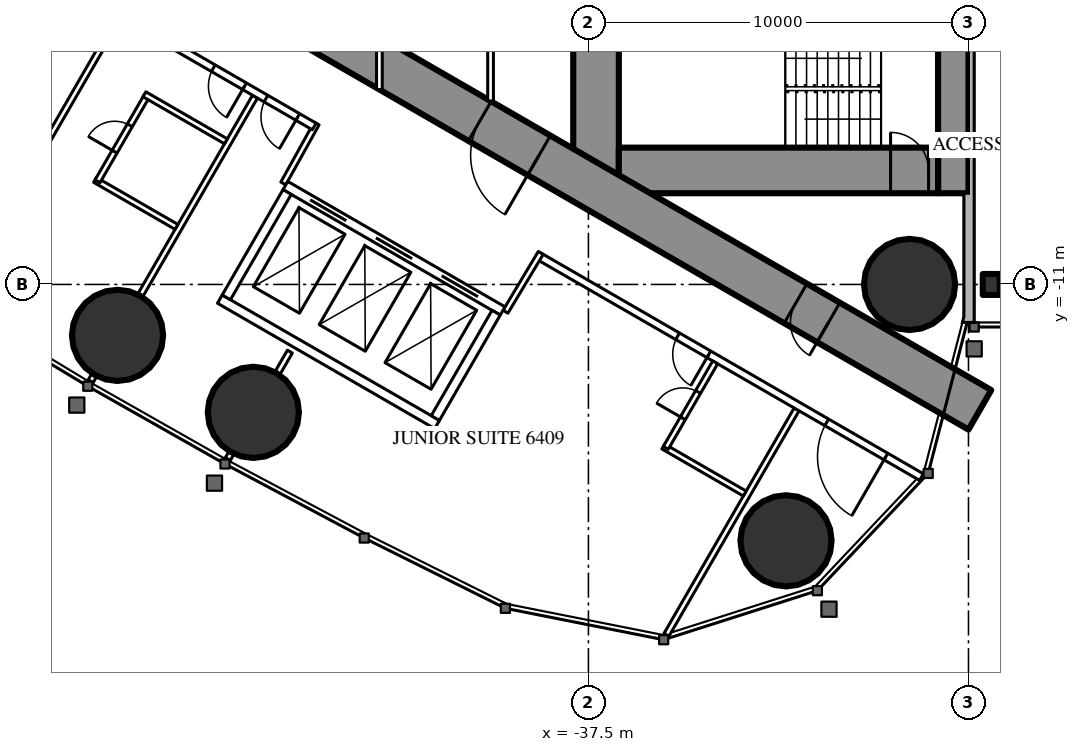
"""IFC4 building model, lengths in metres.
Left out: names, types, materials, properties, quantities, classifications, styles, units other than length and angle.
Written with IfcOpenShell. Run it as: python <this file> out.ifc"""

import sys

from ifc_helpers import new_model, si_unit, direction, frame, frame_2d, origin, origin_2d, place, context, subcontext, project, spatial, rectangle, circle, i_section, extrude, element, fill, save


model = new_model("IFC4")
c1 = context("Model", 3, precision=1e-05, world=origin(), true_north=direction((0.0, 1.0)))
c2 = subcontext(c1, "Body", "Model", "MODEL_VIEW")
j1 = project(units=[si_unit("LENGTHUNIT", "METRE"), si_unit("PLANEANGLEUNIT", "RADIAN")], contexts=[c1])
p1 = place(None, origin())
s1 = spatial("IfcSite", under=j1, at=p1, CompositionType="ELEMENT")
p2 = place(p1, origin())
s2 = spatial("IfcBuilding", under=s1, at=p2, CompositionType="ELEMENT")
p3 = place(p2, frame((0.0, 0.0, 240.5)))
s3 = spatial("IfcBuildingStorey", under=s2, at=p3, CompositionType="ELEMENT", Elevation=240.5)
for number, where, z_axis, x_axis in (
    (1, (-32.301, -17.745, 0.0), (0.0, 0.0, 1.0), (1.0, 0.0, 0.0)),
    (2, (-29.05, -11.0, 0.0), (0.0, 0.0, 1.0), (1.0, 0.0, 0.0)),
    (3, (-49.89, -12.34, 0.0), (0.0, 0.0, 1.0), (1.0, 0.0, 0.0)),
    (4, (-46.317, -14.365, 0.0), (0.0, 0.0, 1.0), (1.0, 0.0, 0.0)),
):
    element("IfcColumn", number, at=place(p3, frame(where, z_axis=z_axis, x_axis=x_axis)), inside=s3, PredefinedType="COLUMN", context=c2, shape_type="SweptSolid", body=[
        extrude(circle(Radius=1.2, at=origin_2d()), origin(), (0.0, 0.0, 1.0), 3.6),
    ])
p4 = place(p3, frame((-27.9, 8.6, 0.0), z_axis=(0.0, 0.0, 1.0), x_axis=(0.0, -1.0, 0.0)))
e5 = element("IfcWall", 5, at=p4, inside=s3, PredefinedType="SHEAR", context=c2, shape_type="SweptSolid", body=[
    extrude(rectangle(XDim=17.2, YDim=0.8, at=frame_2d((8.6, 0.0))), origin(), (0.0, 0.0, 1.0), 3.6),
])
p5 = place(p4, frame((6.95, 0.0, 0.0)))
e6 = element("IfcOpeningElement", 6, at=p5, cuts=e5, PredefinedType="OPENING", context=c2, shape_type="SweptSolid", body=[
    extrude(rectangle(XDim=0.9, YDim=2.2, at=frame_2d((0.45, 1.1))), frame((0.0, 0.41, 0.0), z_axis=(0.0, -1.0, 0.0), x_axis=(1.0, 0.0, 0.0)), (0.0, 0.0, 1.0), 0.82),
])
p6 = place(p3, frame((-37.3, 8.6, 0.0), z_axis=(0.0, 0.0, 1.0), x_axis=(0.0, -1.0, 0.0)))
e7 = element("IfcWall", 7, at=p6, inside=s3, PredefinedType="SHEAR", context=c2, shape_type="SweptSolid", body=[
    extrude(rectangle(XDim=17.2, YDim=1.2, at=frame_2d((8.6, 0.0))), origin(), (0.0, 0.0, 1.0), 3.6),
])
p7 = place(p6, frame((7.7, 0.0, 0.0)))
e8 = element("IfcOpeningElement", 8, at=p7, cuts=e7, PredefinedType="OPENING", context=c2, shape_type="SweptSolid", body=[
    extrude(rectangle(XDim=1.8, YDim=2.2, at=frame_2d((0.9, 1.1))), frame((0.0, 0.61, 0.0), z_axis=(0.0, -1.0, 0.0), x_axis=(1.0, 0.0, 0.0)), (0.0, 0.0, 1.0), 1.22),
])
p8 = place(p3, frame((-28.3, -8.0, 0.0), z_axis=(0.0, 0.0, 1.0), x_axis=(-1.0, 0.0, 0.0)))
e9 = element("IfcWall", 9, at=p8, inside=s3, PredefinedType="SHEAR", context=c2, shape_type="SweptSolid", body=[
    extrude(rectangle(XDim=8.4, YDim=1.2, at=frame_2d((4.2, 0.0))), origin(), (0.0, 0.0, 1.0), 3.6),
])
p9 = place(p8, frame((0.25, 0.0, 0.0)))
e10 = element("IfcOpeningElement", 10, at=p9, cuts=e9, PredefinedType="OPENING", context=c2, shape_type="SweptSolid", body=[
    extrude(rectangle(XDim=1.0, YDim=2.2, at=frame_2d((0.5, 1.1))), frame((0.0, 0.61, 0.0), z_axis=(0.0, -1.0, 0.0), x_axis=(1.0, 0.0, 0.0)), (0.0, 0.0, 1.0), 1.22),
])
p10 = place(p3, frame((-27.2, -14.3, 0.0), z_axis=(0.0, 0.0, 1.0), x_axis=(-0.866024021859, 0.500002393557, 0.0)))
e11 = element("IfcWall", 11, at=p10, inside=s3, PredefinedType="SHEAR", context=c2, shape_type="SweptSolid", body=[
    extrude(rectangle(XDim=27.907, YDim=1.2, at=frame_2d((13.954, 0.0))), origin(), (0.0, 0.0, 1.0), 3.6),
])
p11 = place(p10, frame((4.6, 0.0, 0.0)))
e12 = element("IfcOpeningElement", 12, at=p11, cuts=e11, PredefinedType="OPENING", context=c2, shape_type="SweptSolid", body=[
    extrude(rectangle(XDim=1.0, YDim=2.2, at=frame_2d((0.5, 1.1))), frame((0.0, 0.61, 0.0), z_axis=(0.0, -1.0, 0.0), x_axis=(1.0, 0.0, 0.0)), (0.0, 0.0, 1.0), 1.22),
])
p12 = place(p10, frame((13.395, 0.0, 0.0)))
e13 = element("IfcOpeningElement", 13, at=p12, cuts=e11, PredefinedType="OPENING", context=c2, shape_type="SweptSolid", body=[
    extrude(rectangle(XDim=1.8, YDim=2.2, at=frame_2d((0.9, 1.1))), frame((0.0, 0.61, 0.0), z_axis=(0.0, -1.0, 0.0), x_axis=(1.0, 0.0, 0.0)), (0.0, 0.0, 1.0), 1.22),
])
p13 = place(p3, frame((-26.9, -11.0, 0.0), z_axis=(0.0, 0.0, 1.0), x_axis=(1.0, 0.0, 0.0)))
e14 = element("IfcColumn", 14, at=p13, inside=s3, PredefinedType="COLUMN", context=c2, shape_type="SweptSolid", body=[
    extrude(i_section(OverallWidth=0.448, OverallDepth=0.55, WebThickness=0.072, FlangeThickness=0.115, FilletRadius=0.02, at=origin_2d()), origin(), (0.0, 0.0, 1.0), 3.6),
])
p14 = place(p3, frame((-32.022, -14.287, 0.0), z_axis=(0.0, 0.0, 1.0), x_axis=(-0.50000019414, -0.866025291697, 0.0)))
e15 = element("IfcWall", 15, at=p14, inside=s3, PredefinedType="PARTITIONING", context=c2, shape_type="SweptSolid", body=[
    extrude(rectangle(XDim=6.848, YDim=0.15, at=frame_2d((3.424, 0.0))), origin(), (0.0, 0.0, 1.0), 3.35),
])
p15 = place(p3, frame((-46.898, -15.439, 0.0), z_axis=(0.0, 0.0, 1.0), x_axis=(-0.500232303069, -0.865891241997, 0.0)))
e16 = element("IfcWall", 16, at=p15, inside=s3, PredefinedType="PARTITIONING", context=c2, shape_type="SweptSolid", body=[
    extrude(rectangle(XDim=0.18, YDim=0.15, at=frame_2d((0.09, 0.0))), origin(), (0.0, 0.0, 1.0), 2.45),
])
p16 = place(p3, frame((-46.274, -6.059, 0.0), z_axis=(0.0, 0.0, 1.0), x_axis=(-0.500020471368, -0.866013584312, 0.0)))
e17 = element("IfcWall", 17, at=p16, inside=s3, PredefinedType="PARTITIONING", context=c2, shape_type="SweptSolid", body=[
    extrude(rectangle(XDim=6.028, YDim=0.15, at=frame_2d((3.014, 0.0))), origin(), (0.0, 0.0, 1.0), 2.45),
])
p17 = place(p3, frame((-50.508, -13.392, 0.0), z_axis=(0.0, 0.0, 1.0), x_axis=(-0.499644091975, -0.866230789891, 0.0)))
e18 = element("IfcWall", 18, at=p17, inside=s3, PredefinedType="PARTITIONING", context=c2, shape_type="SweptSolid", body=[
    extrude(rectangle(XDim=0.18, YDim=0.15, at=frame_2d((0.09, 0.0))), origin(), (0.0, 0.0, 1.0), 2.45),
])
p18 = place(p3, frame((-49.816, -3.898, 0.0), z_axis=(0.0, 0.0, 1.0), x_axis=(-0.500001913541, -0.866024298998, 0.0)))
e19 = element("IfcWall", 19, at=p18, inside=s3, PredefinedType="PARTITIONING", context=c2, shape_type="SweptSolid", body=[
    extrude(rectangle(XDim=6.05, YDim=0.15, at=frame_2d((3.025, 0.0))), origin(), (0.0, 0.0, 1.0), 2.45),
])
p19 = place(p3, frame((-45.356, -12.767, 0.0), z_axis=(0.0, 0.0, 1.0), x_axis=(-0.499886366516, -0.866091000168, 0.0)))
e20 = element("IfcWall", 20, at=p19, inside=s3, PredefinedType="PARTITIONING", context=c2, shape_type="SweptSolid", body=[
    extrude(rectangle(XDim=0.645, YDim=0.15, at=frame_2d((0.322, 0.0))), origin(), (0.0, 0.0, 1.0), 3.35),
])
p20 = place(p3, frame((-28.737, -16.068, 0.0), z_axis=(0.0, 0.0, 1.0), x_axis=(-0.866029399323, 0.49999307946, 0.0)))
e21 = element("IfcWall", 21, at=p20, inside=s3, PredefinedType="PARTITIONING", context=c2, shape_type="SweptSolid", body=[
    extrude(rectangle(XDim=11.61, YDim=0.2, at=frame_2d((5.805, 0.0))), origin(), (0.0, 0.0, 1.0), 3.35),
])
p21 = place(p20, frame((1.08, 0.0, 0.0)))
e22 = element("IfcOpeningElement", 22, at=p21, cuts=e21, PredefinedType="OPENING", context=c2, shape_type="SweptSolid", body=[
    extrude(rectangle(XDim=1.8, YDim=2.03, at=frame_2d((0.9, 1.015))), frame((0.0, 0.11, 0.0), z_axis=(0.0, -1.0, 0.0), x_axis=(1.0, 0.0, 0.0)), (0.0, 0.0, 1.0), 0.22),
])
p22 = place(p20, frame((6.46, 0.0, 0.0)))
e23 = element("IfcOpeningElement", 23, at=p22, cuts=e21, PredefinedType="OPENING", context=c2, shape_type="SweptSolid", body=[
    extrude(rectangle(XDim=0.95, YDim=2.2, at=frame_2d((0.475, 1.1))), frame((0.0, 0.11, 0.0), z_axis=(0.0, -1.0, 0.0), x_axis=(1.0, 0.0, 0.0)), (0.0, 0.0, 1.0), 0.22),
])
for number, where, z_axis, x_axis in (
    (24, (-39.683, -11.718, 0.0), (0.0, 0.0, 1.0), (0.514, 0.858, 0.0)),
    (25, (-44.652, -6.764, 0.0), (0.0, 0.0, 1.0), (-0.485, -0.874, 0.0)),
):
    element("IfcWall", number, at=place(p3, frame(where, z_axis=z_axis, x_axis=x_axis)), inside=s3, PredefinedType="PARTITIONING", context=c2, shape_type="SweptSolid", body=[
        extrude(rectangle(XDim=1.805, YDim=0.15, at=frame_2d((0.903, 0.0))), origin(), (0.0, 0.0, 1.0), 3.35),
    ])
p23 = place(p3, frame((-48.339, -9.486, 0.0), z_axis=(0.0, 0.0, 1.0), x_axis=(-0.866006523861, 0.500032699561, 0.0)))
e26 = element("IfcWall", 26, at=p23, inside=s3, PredefinedType="PARTITIONING", context=c2, shape_type="SweptSolid", body=[
    extrude(rectangle(XDim=2.475, YDim=0.15, at=frame_2d((1.237, 0.0))), origin(), (0.0, 0.0, 1.0), 3.35),
])
p24 = place(p3, frame((-49.117, -6.034, 0.0), z_axis=(0.0, 0.0, 1.0), x_axis=(-0.500006934395, -0.866021400173, 0.0)))
e27 = element("IfcWall", 27, at=p24, inside=s3, PredefinedType="PARTITIONING", context=c2, shape_type="SweptSolid", body=[
    extrude(rectangle(XDim=2.6, YDim=0.15, at=frame_2d((1.3, 0.0))), origin(), (0.0, 0.0, 1.0), 3.35),
])
p25 = place(p24, frame((0.9, 0.0, 0.0)))
e28 = element("IfcOpeningElement", 28, at=p25, cuts=e27, PredefinedType="OPENING", context=c2, shape_type="SweptSolid", body=[
    extrude(rectangle(XDim=0.8, YDim=2.2, at=frame_2d((0.4, 1.1))), frame((0.0, 0.085, 0.0), z_axis=(0.0, -1.0, 0.0), x_axis=(1.0, 0.0, 0.0)), (0.0, 0.0, 1.0), 0.17),
])
p26 = place(p3, frame((-47.039, -7.234, 0.0), z_axis=(0.0, 0.0, 1.0), x_axis=(-0.866073894602, 0.499916002032, 0.0)))
e29 = element("IfcWall", 29, at=p26, inside=s3, PredefinedType="PARTITIONING", context=c2, shape_type="SweptSolid", body=[
    extrude(rectangle(XDim=2.475, YDim=0.15, at=frame_2d((1.238, 0.0))), origin(), (0.0, 0.0, 1.0), 2.5),
])
p27 = place(p3, frame((-33.387, -16.502, 0.0), z_axis=(0.0, 0.0, 1.0), x_axis=(-0.866006523861, 0.500032699561, 0.0)))
e30 = element("IfcWall", 30, at=p27, inside=s3, PredefinedType="PARTITIONING", context=c2, shape_type="SweptSolid", body=[
    extrude(rectangle(XDim=2.475, YDim=0.15, at=frame_2d((1.237, 0.0))), origin(), (0.0, 0.0, 1.0), 3.35),
])
p28 = place(p3, frame((-34.165, -13.05, 0.0), z_axis=(0.0, 0.0, 1.0), x_axis=(-0.500047596559, -0.865997922154, 0.0)))
e31 = element("IfcWall", 31, at=p28, inside=s3, PredefinedType="PARTITIONING", context=c2, shape_type="SweptSolid", body=[
    extrude(rectangle(XDim=2.6, YDim=0.15, at=frame_2d((1.3, 0.0))), origin(), (0.0, 0.0, 1.0), 3.35),
])
p29 = place(p28, frame((0.9, 0.0, 0.0)))
e32 = element("IfcOpeningElement", 32, at=p29, cuts=e31, PredefinedType="OPENING", context=c2, shape_type="SweptSolid", body=[
    extrude(rectangle(XDim=0.8, YDim=2.2, at=frame_2d((0.4, 1.1))), frame((0.0, 0.085, 0.0), z_axis=(0.0, -1.0, 0.0), x_axis=(1.0, 0.0, 0.0)), (0.0, 0.0, 1.0), 0.17),
])
p30 = place(p3, frame((-44.715, -6.844, 0.0), z_axis=(0.0, 0.0, 1.0), x_axis=(-0.866020627653, 0.50000827241, 0.0)))
e33 = element("IfcWall", 33, at=p30, inside=s3, PredefinedType="PARTITIONING", context=c2, shape_type="SweptSolid", body=[
    extrude(rectangle(XDim=5.891, YDim=0.2, at=frame_2d((2.945, 0.0))), origin(), (0.0, 0.0, 1.0), 3.35),
])
p31 = place(p30, frame((2.117, 0.0, 0.0)))
e34 = element("IfcOpeningElement", 34, at=p31, cuts=e33, PredefinedType="OPENING", context=c2, shape_type="SweptSolid", body=[
    extrude(rectangle(XDim=0.95, YDim=2.2, at=frame_2d((0.475, 1.1))), frame((0.0, 0.11, 0.0), z_axis=(0.0, -1.0, 0.0), x_axis=(1.0, 0.0, 0.0)), (0.0, 0.0, 1.0), 0.22),
])
p32 = place(p30, frame((0.5, 0.0, 0.0)))
e35 = element("IfcOpeningElement", 35, at=p32, cuts=e33, PredefinedType="OPENING", context=c2, shape_type="SweptSolid", body=[
    extrude(rectangle(XDim=0.967, YDim=2.2, at=frame_2d((0.483, 1.1))), frame((0.0, 0.11, 0.0), z_axis=(0.0, -1.0, 0.0), x_axis=(1.0, 0.0, 0.0)), (0.0, 0.0, 1.0), 0.22),
])
p33 = place(p3, frame((-40.075, 6.174, 0.0), z_axis=(0.0, 0.0, 1.0), x_axis=(0.0, -1.0, 0.0)))
e36 = element("IfcWall", 36, at=p33, inside=s3, PredefinedType="PARTITIONING", context=c2, shape_type="SweptSolid", body=[
    extrude(rectangle(XDim=12.348, YDim=0.15, at=frame_2d((6.174, 0.0))), origin(), (0.0, 0.0, 1.0), 3.35),
])
p34 = place(p33, frame((5.274, 0.0, 0.0)))
e37 = element("IfcOpeningElement", 37, at=p34, cuts=e36, PredefinedType="OPENING", context=c2, shape_type="SweptSolid", body=[
    extrude(rectangle(XDim=1.8, YDim=2.2, at=frame_2d((0.9, 1.1))), frame((0.0, 0.085, 0.0), z_axis=(0.0, -1.0, 0.0), x_axis=(1.0, 0.0, 0.0)), (0.0, 0.0, 1.0), 0.17),
])
p35 = place(p3, frame((-43.0, 5.871, 0.0), z_axis=(0.0, 0.0, 1.0), x_axis=(0.0, -1.0, 0.0)))
e38 = element("IfcWall", 38, at=p35, inside=s3, PredefinedType="PARTITIONING", context=c2, shape_type="SweptSolid", body=[
    extrude(rectangle(XDim=11.741, YDim=0.15, at=frame_2d((5.871, 0.0))), origin(), (0.0, 0.0, 1.0), 3.35),
])
p36 = place(p35, frame((2.435, 0.0, 0.0)))
e39 = element("IfcOpeningElement", 39, at=p36, cuts=e38, PredefinedType="OPENING", context=c2, shape_type="SweptSolid", body=[
    extrude(rectangle(XDim=1.0, YDim=2.2, at=frame_2d((0.5, 1.1))), frame((0.0, 0.085, 0.0), z_axis=(0.0, -1.0, 0.0), x_axis=(1.0, 0.0, 0.0)), (0.0, 0.0, 1.0), 0.17),
])
p37 = place(p35, frame((8.306, 0.0, 0.0)))
e40 = element("IfcOpeningElement", 40, at=p37, cuts=e38, PredefinedType="OPENING", context=c2, shape_type="SweptSolid", body=[
    extrude(rectangle(XDim=1.0, YDim=2.2, at=frame_2d((0.5, 1.1))), frame((0.0, 0.085, 0.0), z_axis=(0.0, -1.0, 0.0), x_axis=(1.0, 0.0, 0.0)), (0.0, 0.0, 1.0), 0.17),
])
p38 = place(p3, frame((-39.758, -11.697, 0.0), z_axis=(0.0, 0.0, 1.0), x_axis=(-0.866024194504, 0.500002094529, 0.0)))
e41 = element("IfcWall", 41, at=p38, inside=s3, PredefinedType="PARTITIONING", context=c2, shape_type="SweptSolid", body=[
    extrude(rectangle(XDim=6.6, YDim=0.25, at=frame_2d((3.3, 0.0))), origin(), (0.0, 0.0, 1.0), 3.35),
])
p39 = place(p38, frame((0.75, 0.0, 0.0)))
e42 = element("IfcOpeningElement", 42, at=p39, cuts=e41, PredefinedType="OPENING", context=c2, shape_type="SweptSolid", body=[
    extrude(rectangle(XDim=1.1, YDim=2.2, at=frame_2d((0.55, 1.1))), frame((0.0, 0.135, 0.0), z_axis=(0.0, -1.0, 0.0), x_axis=(1.0, 0.0, 0.0)), (0.0, 0.0, 1.0), 0.27),
])
p40 = place(p38, frame((2.75, 0.0, 0.0)))
e43 = element("IfcOpeningElement", 43, at=p40, cuts=e41, PredefinedType="OPENING", context=c2, shape_type="SweptSolid", body=[
    extrude(rectangle(XDim=1.1, YDim=2.2, at=frame_2d((0.55, 1.1))), frame((0.0, 0.135, 0.0), z_axis=(0.0, -1.0, 0.0), x_axis=(1.0, 0.0, 0.0)), (0.0, 0.0, 1.0), 0.27),
])
p41 = place(p38, frame((4.75, 0.0, 0.0)))
e44 = element("IfcOpeningElement", 44, at=p41, cuts=e41, PredefinedType="OPENING", context=c2, shape_type="SweptSolid", body=[
    extrude(rectangle(XDim=1.1, YDim=2.2, at=frame_2d((0.55, 1.1))), frame((0.0, 0.135, 0.0), z_axis=(0.0, -1.0, 0.0), x_axis=(1.0, 0.0, 0.0)), (0.0, 0.0, 1.0), 0.27),
])
p42 = place(p3, frame((-41.482, -14.686, 0.0), z_axis=(0.0, 0.0, 1.0), x_axis=(-0.86603344179, 0.499986077507, 0.0)))
e45 = element("IfcWall", 45, at=p42, inside=s3, PredefinedType="PARTITIONING", context=c2, shape_type="SweptSolid", body=[
    extrude(rectangle(XDim=6.6, YDim=0.25, at=frame_2d((3.3, 0.0))), origin(), (0.0, 0.0, 1.0), 3.35),
])
for number, where, z_axis, x_axis in (
    (46, (-39.928, -11.743, 0.0), (0.0, 0.0, 1.0), (-0.5, -0.866, 0.0)),
    (47, (-45.428, -8.568, 0.0), (0.0, 0.0, 1.0), (-0.5, -0.866, 0.0)),
):
    element("IfcWall", number, at=place(p3, frame(where, z_axis=z_axis, x_axis=x_axis)), inside=s3, PredefinedType="PARTITIONING", context=c2, shape_type="SweptSolid", body=[
        extrude(rectangle(XDim=3.201, YDim=0.25, at=frame_2d((1.6, 0.0))), origin(), (0.0, 0.0, 1.0), 3.35),
    ])
p43 = place(p25, origin())
e48 = element("IfcDoor", 48, at=p43, inside=s3, OperationType="SINGLE_SWING_RIGHT", PredefinedType="DOOR", context=c2, shape_type="SweptSolid", body=[
    extrude(rectangle(XDim=0.8, YDim=2.2, at=frame_2d((0.4, 1.1))), frame((0.0, 0.025, 0.0), z_axis=(0.0, -1.0, 0.0), x_axis=(1.0, 0.0, 0.0)), (0.0, 0.0, 1.0), 0.05),
])
fill(e28, e48)
p44 = place(p31, origin())
e49 = element("IfcDoor", 49, at=p44, inside=s3, OperationType="SINGLE_SWING_LEFT", PredefinedType="DOOR", context=c2, shape_type="SweptSolid", body=[
    extrude(rectangle(XDim=0.95, YDim=2.2, at=frame_2d((0.475, 1.1))), frame((0.0, 0.025, 0.0), z_axis=(0.0, -1.0, 0.0), x_axis=(1.0, 0.0, 0.0)), (0.0, 0.0, 1.0), 0.05),
])
fill(e34, e49)
p45 = place(p21, origin())
e50 = element("IfcDoor", 50, at=p45, inside=s3, OperationType="DOUBLE_DOOR_SINGLE_SWING", PredefinedType="DOOR", context=c2, shape_type="SweptSolid", body=[
    extrude(rectangle(XDim=1.8, YDim=2.03, at=frame_2d((0.9, 1.015))), frame((0.0, 0.025, 0.0), z_axis=(0.0, -1.0, 0.0), x_axis=(1.0, 0.0, 0.0)), (0.0, 0.0, 1.0), 0.05),
])
fill(e22, e50)
p46 = place(p29, origin())
e51 = element("IfcDoor", 51, at=p46, inside=s3, OperationType="SINGLE_SWING_RIGHT", PredefinedType="DOOR", context=c2, shape_type="SweptSolid", body=[
    extrude(rectangle(XDim=0.8, YDim=2.2, at=frame_2d((0.4, 1.1))), frame((0.0, 0.025, 0.0), z_axis=(0.0, -1.0, 0.0), x_axis=(1.0, 0.0, 0.0)), (0.0, 0.0, 1.0), 0.05),
])
fill(e32, e51)
p47 = place(p22, origin())
e52 = element("IfcDoor", 52, at=p47, inside=s3, OperationType="SINGLE_SWING_LEFT", PredefinedType="DOOR", context=c2, shape_type="SweptSolid", body=[
    extrude(rectangle(XDim=0.95, YDim=2.2, at=frame_2d((0.475, 1.1))), frame((0.0, 0.025, 0.0), z_axis=(0.0, -1.0, 0.0), x_axis=(1.0, 0.0, 0.0)), (0.0, 0.0, 1.0), 0.05),
])
fill(e23, e52)
p48 = place(p32, origin())
e53 = element("IfcDoor", 53, at=p48, inside=s3, OperationType="SINGLE_SWING_LEFT", PredefinedType="DOOR", context=c2, shape_type="SweptSolid", body=[
    extrude(rectangle(XDim=0.967, YDim=2.2, at=frame_2d((0.483, 1.1))), frame((0.0, 0.025, 0.0), z_axis=(0.0, -1.0, 0.0), x_axis=(1.0, 0.0, 0.0)), (0.0, 0.0, 1.0), 0.05),
])
fill(e35, e53)
p49 = place(p11, origin())
e54 = element("IfcDoor", 54, at=p49, inside=s3, OperationType="SINGLE_SWING_LEFT", PredefinedType="DOOR", context=c2, shape_type="SweptSolid", body=[
    extrude(rectangle(XDim=1.0, YDim=2.2, at=frame_2d((0.5, 1.1))), frame((0.0, 0.025, 0.0), z_axis=(0.0, -1.0, 0.0), x_axis=(1.0, 0.0, 0.0)), (0.0, 0.0, 1.0), 0.05),
])
fill(e12, e54)
p50 = place(p12, origin())
e55 = element("IfcDoor", 55, at=p50, inside=s3, OperationType="DOUBLE_DOOR_SINGLE_SWING", PredefinedType="DOOR", context=c2, shape_type="SweptSolid", body=[
    extrude(rectangle(XDim=1.8, YDim=2.2, at=frame_2d((0.9, 1.1))), frame((0.0, 0.025, 0.0), z_axis=(0.0, -1.0, 0.0), x_axis=(1.0, 0.0, 0.0)), (0.0, 0.0, 1.0), 0.05),
])
fill(e13, e55)
p51 = place(p9, origin())
e56 = element("IfcDoor", 56, at=p51, inside=s3, OperationType="SINGLE_SWING_RIGHT", PredefinedType="DOOR", context=c2, shape_type="SweptSolid", body=[
    extrude(rectangle(XDim=1.0, YDim=2.2, at=frame_2d((0.5, 1.1))), frame((0.0, 0.025, 0.0), z_axis=(0.0, -1.0, 0.0), x_axis=(1.0, 0.0, 0.0)), (0.0, 0.0, 1.0), 0.05),
])
fill(e10, e56)
p52 = place(p39, origin())
e57 = element("IfcDoor", 57, at=p52, inside=s3, OperationType="DOUBLE_DOOR_SLIDING", PredefinedType="USERDEFINED", context=c2, shape_type="SweptSolid", body=[
    extrude(rectangle(XDim=1.1, YDim=2.2, at=frame_2d((0.55, 1.1))), frame((0.0, 0.025, 0.0), z_axis=(0.0, -1.0, 0.0), x_axis=(1.0, 0.0, 0.0)), (0.0, 0.0, 1.0), 0.05),
])
fill(e42, e57)
p53 = place(p40, origin())
e58 = element("IfcDoor", 58, at=p53, inside=s3, OperationType="DOUBLE_DOOR_SLIDING", PredefinedType="USERDEFINED", context=c2, shape_type="SweptSolid", body=[
    extrude(rectangle(XDim=1.1, YDim=2.2, at=frame_2d((0.55, 1.1))), frame((0.0, 0.025, 0.0), z_axis=(0.0, -1.0, 0.0), x_axis=(1.0, 0.0, 0.0)), (0.0, 0.0, 1.0), 0.05),
])
fill(e43, e58)
p54 = place(p41, origin())
e59 = element("IfcDoor", 59, at=p54, inside=s3, OperationType="DOUBLE_DOOR_SLIDING", PredefinedType="USERDEFINED", context=c2, shape_type="SweptSolid", body=[
    extrude(rectangle(XDim=1.1, YDim=2.2, at=frame_2d((0.55, 1.1))), frame((0.0, 0.025, 0.0), z_axis=(0.0, -1.0, 0.0), x_axis=(1.0, 0.0, 0.0)), (0.0, 0.0, 1.0), 0.05),
])
fill(e44, e59)
save(model, sys.argv[1])
